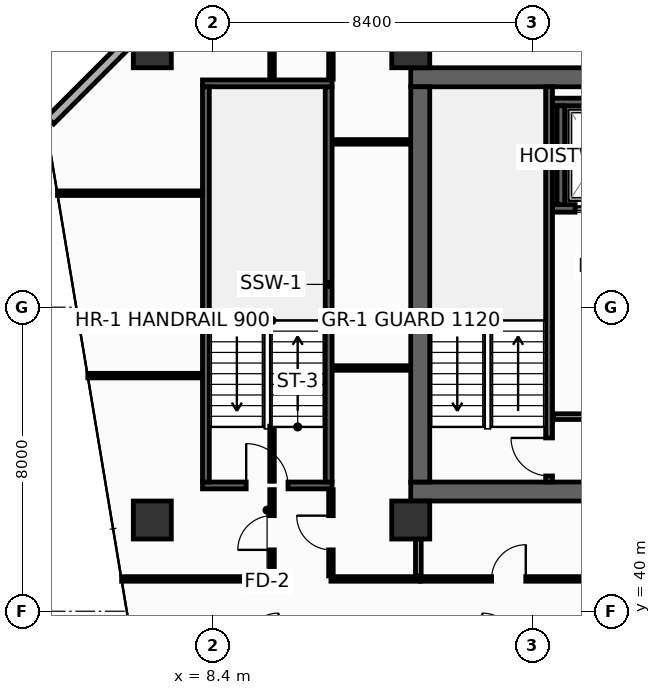
"""IFC4 building model, lengths in metres.
Left out: names, types, materials, properties, quantities, classifications, styles, units other than length and angle.
Written with IfcOpenShell. Run it as: python <this file> out.ifc"""

import sys

from ifc_helpers import new_model, si_unit, direction, frame, frame_2d, origin, origin_2d, place, context, subcontext, project, spatial, rectangle, hollow_rectangle, extrude, element, fill, save


model = new_model("IFC4")
c1 = context("Model", 3, precision=1e-05, world=origin(), true_north=direction((0.0, 1.0)))
c2 = subcontext(c1, "Body", "Model", "MODEL_VIEW")
j1 = project(units=[si_unit("LENGTHUNIT", "METRE"), si_unit("PLANEANGLEUNIT", "RADIAN")], contexts=[c1])
p1 = place(None, origin())
s1 = spatial("IfcSite", under=j1, at=p1, CompositionType="ELEMENT")
p2 = place(p1, origin())
s2 = spatial("IfcBuilding", under=s1, at=p2, CompositionType="ELEMENT")
p3 = place(p2, frame((0.0, 0.0, 163.8)))
s3 = spatial("IfcBuildingStorey", under=s2, at=p3, CompositionType="ELEMENT", Elevation=163.8)
p4 = place(p3, frame((13.6, 43.15, 0.0), z_axis=(0.0, 0.0, 1.0), x_axis=(1.0, 0.0, 0.0)))
e1 = element("IfcWall", 1, at=p4, inside=s3, PredefinedType="SHEAR", context=c2, shape_type="SweptSolid", body=[
    extrude(rectangle(XDim=32.7, YDim=0.5, at=frame_2d((16.35, 0.0))), origin(), (0.0, 0.0, 1.0), 3.55),
])
p5 = place(p4, frame((5.4, 0.0, 0.0)))
e2 = element("IfcOpeningElement", 2, at=p5, cuts=e1, PredefinedType="OPENING", context=c2, shape_type="SweptSolid", body=[
    extrude(rectangle(XDim=1.1, YDim=2.15, at=frame_2d((0.55, 1.075))), frame((0.0, 0.26, 0.0), z_axis=(0.0, -1.0, 0.0), x_axis=(1.0, 0.0, 0.0)), (0.0, 0.0, 1.0), 0.52),
])
p6 = place(p4, frame((25.6, 0.0, 0.0)))
e3 = element("IfcOpeningElement", 3, at=p6, cuts=e1, PredefinedType="OPENING", context=c2, shape_type="SweptSolid", body=[
    extrude(rectangle(XDim=1.1, YDim=2.15, at=frame_2d((0.55, 1.075))), frame((0.0, 0.26, 0.0), z_axis=(0.0, -1.0, 0.0), x_axis=(1.0, 0.0, 0.0)), (0.0, 0.0, 1.0), 0.52),
])
p7 = place(p3, frame((13.6, 54.05, 0.0), z_axis=(0.0, 0.0, 1.0), x_axis=(1.0, 0.0, 0.0)))
e4 = element("IfcWall", 4, at=p7, inside=s3, PredefinedType="SHEAR", context=c2, shape_type="SweptSolid", body=[
    extrude(rectangle(XDim=32.7, YDim=0.5, at=frame_2d((16.35, 0.0))), origin(), (0.0, 0.0, 1.0), 3.55),
])
p8 = place(p3, frame((13.85, 43.4, 0.0), z_axis=(0.0, 0.0, 1.0), x_axis=(0.0, 1.0, 0.0)))
e5 = element("IfcWall", 5, at=p8, inside=s3, PredefinedType="SHEAR", context=c2, shape_type="SweptSolid", body=[
    extrude(rectangle(XDim=10.4, YDim=0.5, at=frame_2d((5.2, 0.0))), origin(), (0.0, 0.0, 1.0), 3.55),
])
for number, where, z_axis, x_axis in (
    (6, (6.8, 54.8, 0.0), (0.0, 0.0, 1.0), (1.0, 0.0, 0.0)),
    (7, (13.6, 54.8, 0.0), (0.0, 0.0, 1.0), (1.0, 0.0, 0.0)),
    (8, (6.8, 42.4, 0.0), (0.0, 0.0, 1.0), (1.0, 0.0, 0.0)),
    (9, (13.6, 42.4, 0.0), (0.0, 0.0, 1.0), (1.0, 0.0, 0.0)),
):
    element("IfcColumn", number, at=place(p3, frame(where, z_axis=z_axis, x_axis=x_axis)), inside=s3, PredefinedType="COLUMN", context=c2, shape_type="SweptSolid", body=[
        extrude(hollow_rectangle(XDim=1.0, YDim=1.0, WallThickness=0.045, at=origin_2d()), origin(), (0.0, 0.0, 1.0), 3.8),
    ])
p9 = place(p3, frame((17.33, 50.6, 0.0), z_axis=(0.0, 0.0, 1.0), x_axis=(1.0, 0.0, 0.0)))
e10 = element("IfcWall", 10, at=p9, inside=s3, PredefinedType="SHEAR", context=c2, shape_type="SweptSolid", body=[
    extrude(rectangle(XDim=2.52, YDim=0.2, at=frame_2d((1.26, 0.0))), origin(), (0.0, 0.0, 1.0), 3.55),
])
p10 = place(p9, frame((0.595, 0.0, 0.0)))
e11 = element("IfcOpeningElement", 11, at=p10, cuts=e10, PredefinedType="OPENING", context=c2, shape_type="SweptSolid", body=[
    extrude(rectangle(XDim=1.25, YDim=2.3, at=frame_2d((0.625, 1.15))), frame((0.0, 0.11, 0.0), z_axis=(0.0, -1.0, 0.0), x_axis=(1.0, 0.0, 0.0)), (0.0, 0.0, 1.0), 0.22),
])
p11 = place(p3, frame((17.33, 53.4, 0.0), z_axis=(0.0, 0.0, 1.0), x_axis=(1.0, 0.0, 0.0)))
e12 = element("IfcWall", 12, at=p11, inside=s3, PredefinedType="SHEAR", context=c2, shape_type="SweptSolid", body=[
    extrude(rectangle(XDim=2.52, YDim=0.2, at=frame_2d((1.26, 0.0))), origin(), (0.0, 0.0, 1.0), 3.55),
])
p12 = place(p3, frame((17.55, 50.7, 0.0), z_axis=(0.0, 0.0, 1.0), x_axis=(0.0, 1.0, 0.0)))
e13 = element("IfcWall", 13, at=p12, inside=s3, PredefinedType="SHEAR", context=c2, shape_type="SweptSolid", body=[
    extrude(rectangle(XDim=2.6, YDim=0.2, at=frame_2d((1.3, 0.0))), origin(), (0.0, 0.0, 1.0), 3.55),
])
p13 = place(p3, frame((17.24, 43.4, 0.0), z_axis=(0.0, 0.0, 1.0), x_axis=(0.0, 1.0, 0.0)))
e14 = element("IfcWall", 14, at=p13, inside=s3, PredefinedType="SHEAR", context=c2, shape_type="SweptSolid", body=[
    extrude(rectangle(XDim=10.4, YDim=0.18, at=frame_2d((5.2, 0.0))), origin(), (0.0, 0.0, 1.0), 3.55),
])
p14 = place(p13, frame((0.16, 0.0, 0.0)))
e15 = element("IfcOpeningElement", 15, at=p14, cuts=e14, PredefinedType="OPENING", context=c2, shape_type="SweptSolid", body=[
    extrude(rectangle(XDim=1.0, YDim=2.15, at=frame_2d((0.5, 1.075))), frame((0.0, 0.1, 0.0), z_axis=(0.0, -1.0, 0.0), x_axis=(1.0, 0.0, 0.0)), (0.0, 0.0, 1.0), 0.2),
])
p15 = place(p3, frame((8.12, 43.31, 0.0), z_axis=(0.0, 0.0, 1.0), x_axis=(1.0, 0.0, 0.0)))
e16 = element("IfcWall", 16, at=p15, inside=s3, PredefinedType="SHEAR", context=c2, shape_type="SweptSolid", body=[
    extrude(rectangle(XDim=3.41, YDim=0.18, at=frame_2d((1.705, 0.0))), origin(), (0.0, 0.0, 1.0), 3.55),
])
p16 = place(p15, frame((1.15, 0.0, 0.0)))
e17 = element("IfcOpeningElement", 17, at=p16, cuts=e16, PredefinedType="OPENING", context=c2, shape_type="SweptSolid", body=[
    extrude(rectangle(XDim=1.1, YDim=2.15, at=frame_2d((0.55, 1.075))), frame((0.0, 0.1, 0.0), z_axis=(0.0, -1.0, 0.0), x_axis=(1.0, 0.0, 0.0)), (0.0, 0.0, 1.0), 0.2),
])
p17 = place(p3, frame((11.44, 43.4, 0.0), z_axis=(0.0, 0.0, 1.0), x_axis=(0.0, 1.0, 0.0)))
e18 = element("IfcWall", 18, at=p17, inside=s3, PredefinedType="SHEAR", context=c2, shape_type="SweptSolid", body=[
    extrude(rectangle(XDim=10.4, YDim=0.18, at=frame_2d((5.2, 0.0))), origin(), (0.0, 0.0, 1.0), 3.55),
])
p18 = place(p3, frame((11.53, 53.89, 0.0), z_axis=(0.0, 0.0, 1.0), x_axis=(-1.0, 0.0, 0.0)))
e19 = element("IfcWall", 19, at=p18, inside=s3, PredefinedType="SHEAR", context=c2, shape_type="SweptSolid", body=[
    extrude(rectangle(XDim=3.41, YDim=0.18, at=frame_2d((1.705, 0.0))), origin(), (0.0, 0.0, 1.0), 3.55),
])
p19 = place(p3, frame((8.21, 53.8, 0.0), z_axis=(0.0, 0.0, 1.0), x_axis=(0.0, -1.0, 0.0)))
e20 = element("IfcWall", 20, at=p19, inside=s3, PredefinedType="SHEAR", context=c2, shape_type="SweptSolid", body=[
    extrude(rectangle(XDim=10.4, YDim=0.18, at=frame_2d((5.2, 0.0))), origin(), (0.0, 0.0, 1.0), 3.55),
])
p20 = place(p3, frame((17.36, 45.12, 0.0), z_axis=(0.0, 0.0, 1.0), x_axis=(1.0, 0.0, 0.0)))
e21 = element("IfcWall", 21, at=p20, inside=s3, PredefinedType="PARTITIONING", context=c2, shape_type="SweptSolid", body=[
    extrude(rectangle(XDim=5.14, YDim=0.15, at=frame_2d((2.57, 0.0))), origin(), (0.0, 0.0, 1.0), 3.55),
])
p21 = place(p20, frame((1.8, 0.0, 0.0)))
e22 = element("IfcOpeningElement", 22, at=p21, cuts=e21, PredefinedType="OPENING", context=c2, shape_type="SweptSolid", body=[
    extrude(rectangle(XDim=1.1, YDim=2.15, at=frame_2d((0.55, 1.075))), frame((0.0, 0.085, 0.0), z_axis=(0.0, -1.0, 0.0), x_axis=(1.0, 0.0, 0.0)), (0.0, 0.0, 1.0), 0.17),
])
p22 = place(p3, frame((7.087, 55.887, 0.0), z_axis=(0.0, 0.0, 1.0), x_axis=(-0.707106781187, -0.707106781187, 0.0)))
e23 = element("IfcWall", 23, at=p22, inside=s3, PredefinedType="STANDARD", context=c2, shape_type="SweptSolid", body=[
    extrude(rectangle(XDim=4.206, YDim=0.26, at=frame_2d((2.103, 0.0))), origin(), (0.0, 0.0, 1.0), 3.55),
])
p23 = place(p3, frame((5.992, 40.85, 0.0), z_axis=(0.0, 0.0, 1.0), x_axis=(1.0, 0.0, 0.0)))
e24 = element("IfcWall", 24, at=p23, inside=s3, PredefinedType="PARTITIONING", context=c2, shape_type="SweptSolid", body=[
    extrude(rectangle(XDim=3.958, YDim=0.12, at=frame_2d((1.979, 0.0))), origin(), (0.0, 0.0, 1.0), 3.035),
])
p24 = place(p3, frame((11.5, 40.85, 0.0), z_axis=(0.0, 0.0, 1.0), x_axis=(1.0, 0.0, 0.0)))
e25 = element("IfcWall", 25, at=p24, inside=s3, PredefinedType="PARTITIONING", context=c2, shape_type="SweptSolid", body=[
    extrude(rectangle(XDim=2.35, YDim=0.12, at=frame_2d((1.175, 0.0))), origin(), (0.0, 0.0, 1.0), 3.55),
])
p25 = place(p3, frame((11.55, 52.35, 0.0), z_axis=(0.0, 0.0, 1.0), x_axis=(1.0, 0.0, 0.0)))
e26 = element("IfcWall", 26, at=p25, inside=s3, PredefinedType="PARTITIONING", context=c2, shape_type="SweptSolid", body=[
    extrude(rectangle(XDim=2.03, YDim=0.12, at=frame_2d((1.015, 0.0))), origin(), (0.0, 0.0, 1.0), 3.55),
])
p26 = place(p3, frame((11.5, 54.0, 0.0), z_axis=(0.0, 0.0, 1.0), x_axis=(0.0, 1.0, 0.0)))
e27 = element("IfcWall", 27, at=p26, inside=s3, PredefinedType="PARTITIONING", context=c2, shape_type="SweptSolid", body=[
    extrude(rectangle(XDim=1.995, YDim=0.12, at=frame_2d((0.998, 0.0))), origin(), (0.0, 0.0, 1.0), 2.935),
])
p27 = place(p3, frame((5.102, 46.2, 0.0), z_axis=(0.0, 0.0, 1.0), x_axis=(1.0, 0.0, 0.0)))
e28 = element("IfcWall", 28, at=p27, inside=s3, PredefinedType="PARTITIONING", context=c2, shape_type="SweptSolid", body=[
    extrude(rectangle(XDim=2.998, YDim=0.12, at=frame_2d((1.499, 0.0))), origin(), (0.0, 0.0, 1.0), 2.835),
])
p28 = place(p3, frame((4.304, 51.0, 0.0), z_axis=(0.0, 0.0, 1.0), x_axis=(1.0, 0.0, 0.0)))
e29 = element("IfcWall", 29, at=p28, inside=s3, PredefinedType="PARTITIONING", context=c2, shape_type="SweptSolid", body=[
    extrude(rectangle(XDim=3.796, YDim=0.12, at=frame_2d((1.898, 0.0))), origin(), (0.0, 0.0, 1.0), 2.835),
])
p29 = place(p3, frame((9.95, 40.93, 0.0), z_axis=(0.0, 0.0, 1.0), x_axis=(0.0, 1.0, 0.0)))
e30 = element("IfcWall", 30, at=p29, inside=s3, PredefinedType="PARTITIONING", context=c2, shape_type="SweptSolid", body=[
    extrude(rectangle(XDim=2.27, YDim=0.12, at=frame_2d((1.135, 0.0))), origin(), (0.0, 0.0, 1.0), 2.835),
])
p30 = place(p29, frame((0.685, 0.0, 0.0)))
e31 = element("IfcOpeningElement", 31, at=p30, cuts=e30, PredefinedType="OPENING", context=c2, shape_type="SweptSolid", body=[
    extrude(rectangle(XDim=0.9, YDim=2.1, at=frame_2d((0.45, 1.05))), frame((0.0, 0.07, 0.0), z_axis=(0.0, -1.0, 0.0), x_axis=(1.0, 0.0, 0.0)), (0.0, 0.0, 1.0), 0.14),
])
p31 = place(p3, frame((9.95, 43.42, 0.0), z_axis=(0.0, 0.0, 1.0), x_axis=(0.0, 1.0, 0.0)))
e32 = element("IfcWall", 32, at=p31, inside=s3, PredefinedType="PARTITIONING", context=c2, shape_type="SweptSolid", body=[
    extrude(rectangle(XDim=1.45, YDim=0.12, at=frame_2d((0.725, 0.0))), origin(), (0.0, 0.0, 1.0), 3.55),
])
p32 = place(p3, frame((9.95, 54.0, 0.0), z_axis=(0.0, 0.0, 1.0), x_axis=(0.0, 1.0, 0.0)))
e33 = element("IfcWall", 33, at=p32, inside=s3, PredefinedType="PARTITIONING", context=c2, shape_type="SweptSolid", body=[
    extrude(rectangle(XDim=1.995, YDim=0.12, at=frame_2d((0.998, 0.0))), origin(), (0.0, 0.0, 1.0), 2.935),
])
p33 = place(p3, frame((11.55, 46.4, 0.0), z_axis=(0.0, 0.0, 1.0), x_axis=(1.0, 0.0, 0.0)))
e34 = element("IfcWall", 34, at=p33, inside=s3, PredefinedType="PARTITIONING", context=c2, shape_type="SweptSolid", body=[
    extrude(rectangle(XDim=2.03, YDim=0.12, at=frame_2d((1.015, 0.0))), origin(), (0.0, 0.0, 1.0), 3.55),
])
p34 = place(p3, frame((11.5, 40.93, 0.0), z_axis=(0.0, 0.0, 1.0), x_axis=(0.0, 1.0, 0.0)))
e35 = element("IfcWall", 35, at=p34, inside=s3, PredefinedType="PARTITIONING", context=c2, shape_type="SweptSolid", body=[
    extrude(rectangle(XDim=2.27, YDim=0.12, at=frame_2d((1.135, 0.0))), origin(), (0.0, 0.0, 1.0), 2.835),
])
p35 = place(p34, frame((0.685, 0.0, 0.0)))
e36 = element("IfcOpeningElement", 36, at=p35, cuts=e35, PredefinedType="OPENING", context=c2, shape_type="SweptSolid", body=[
    extrude(rectangle(XDim=0.9, YDim=2.1, at=frame_2d((0.45, 1.05))), frame((0.0, 0.07, 0.0), z_axis=(0.0, -1.0, 0.0), x_axis=(1.0, 0.0, 0.0)), (0.0, 0.0, 1.0), 0.14),
])
p36 = place(p3, frame((13.8, 40.93, 0.0), z_axis=(0.0, 0.0, 1.0), x_axis=(0.0, 1.0, 0.0)))
e37 = element("IfcWall", 37, at=p36, inside=s3, PredefinedType="PARTITIONING", context=c2, shape_type="SweptSolid", body=[
    extrude(rectangle(XDim=1.95, YDim=0.15, at=frame_2d((0.975, 0.0))), origin(), (0.0, 0.0, 1.0), 3.55),
])
p37 = place(p3, frame((13.85, 40.85, 0.0), z_axis=(0.0, 0.0, 1.0), x_axis=(1.0, 0.0, 0.0)))
e38 = element("IfcWall", 38, at=p37, inside=s3, PredefinedType="PARTITIONING", context=c2, shape_type="SweptSolid", body=[
    extrude(rectangle(XDim=4.655, YDim=0.12, at=frame_2d((2.327, 0.0))), origin(), (0.0, 0.0, 1.0), 3.55),
])
p38 = place(p37, frame((1.877, 0.0, 0.0)))
e39 = element("IfcOpeningElement", 39, at=p38, cuts=e38, PredefinedType="OPENING", context=c2, shape_type="SweptSolid", body=[
    extrude(rectangle(XDim=0.9, YDim=2.1, at=frame_2d((0.45, 1.05))), frame((0.0, 0.07, 0.0), z_axis=(0.0, -1.0, 0.0), x_axis=(1.0, 0.0, 0.0)), (0.0, 0.0, 1.0), 0.14),
])
p39 = place(p10, origin())
e40 = element("IfcDoor", 40, at=p39, inside=s3, OperationType="SLIDING_TO_LEFT", PredefinedType="DOOR", context=c2, shape_type="SweptSolid", body=[
    extrude(rectangle(XDim=1.25, YDim=2.3, at=frame_2d((0.625, 1.15))), frame((0.0, 0.025, 0.0), z_axis=(0.0, -1.0, 0.0), x_axis=(1.0, 0.0, 0.0)), (0.0, 0.0, 1.0), 0.05),
])
fill(e11, e40)
p40 = place(p14, origin())
e41 = element("IfcDoor", 41, at=p40, inside=s3, OperationType="SINGLE_SWING_RIGHT", PredefinedType="DOOR", context=c2, shape_type="SweptSolid", body=[
    extrude(rectangle(XDim=1.0, YDim=2.15, at=frame_2d((0.5, 1.075))), frame((0.0, 0.025, 0.0), z_axis=(0.0, -1.0, 0.0), x_axis=(1.0, 0.0, 0.0)), (0.0, 0.0, 1.0), 0.05),
])
fill(e15, e41)
p41 = place(p16, origin())
e42 = element("IfcDoor", 42, at=p41, inside=s3, OperationType="SINGLE_SWING_LEFT", PredefinedType="DOOR", context=c2, shape_type="SweptSolid", body=[
    extrude(rectangle(XDim=1.1, YDim=2.15, at=frame_2d((0.55, 1.075))), frame((0.0, 0.025, 0.0), z_axis=(0.0, -1.0, 0.0), x_axis=(1.0, 0.0, 0.0)), (0.0, 0.0, 1.0), 0.05),
])
fill(e17, e42)
p42 = place(p30, origin())
e43 = element("IfcDoor", 43, at=p42, inside=s3, OperationType="SINGLE_SWING_LEFT", PredefinedType="DOOR", context=c2, shape_type="SweptSolid", body=[
    extrude(rectangle(XDim=0.9, YDim=2.1, at=frame_2d((0.45, 1.05))), frame((0.0, 0.025, 0.0), z_axis=(0.0, -1.0, 0.0), x_axis=(1.0, 0.0, 0.0)), (0.0, 0.0, 1.0), 0.05),
])
fill(e31, e43)
p43 = place(p35, origin())
e44 = element("IfcDoor", 44, at=p43, inside=s3, OperationType="SINGLE_SWING_RIGHT", PredefinedType="DOOR", context=c2, shape_type="SweptSolid", body=[
    extrude(rectangle(XDim=0.9, YDim=2.1, at=frame_2d((0.45, 1.05))), frame((0.0, 0.025, 0.0), z_axis=(0.0, -1.0, 0.0), x_axis=(1.0, 0.0, 0.0)), (0.0, 0.0, 1.0), 0.05),
])
fill(e36, e44)
p44 = place(p38, origin())
e45 = element("IfcDoor", 45, at=p44, inside=s3, OperationType="SINGLE_SWING_RIGHT", PredefinedType="DOOR", context=c2, shape_type="SweptSolid", body=[
    extrude(rectangle(XDim=0.9, YDim=2.1, at=frame_2d((0.45, 1.05))), frame((0.0, 0.025, 0.0), z_axis=(0.0, -1.0, 0.0), x_axis=(1.0, 0.0, 0.0)), (0.0, 0.0, 1.0), 0.05),
])
fill(e39, e45)
save(model, sys.argv[1])
